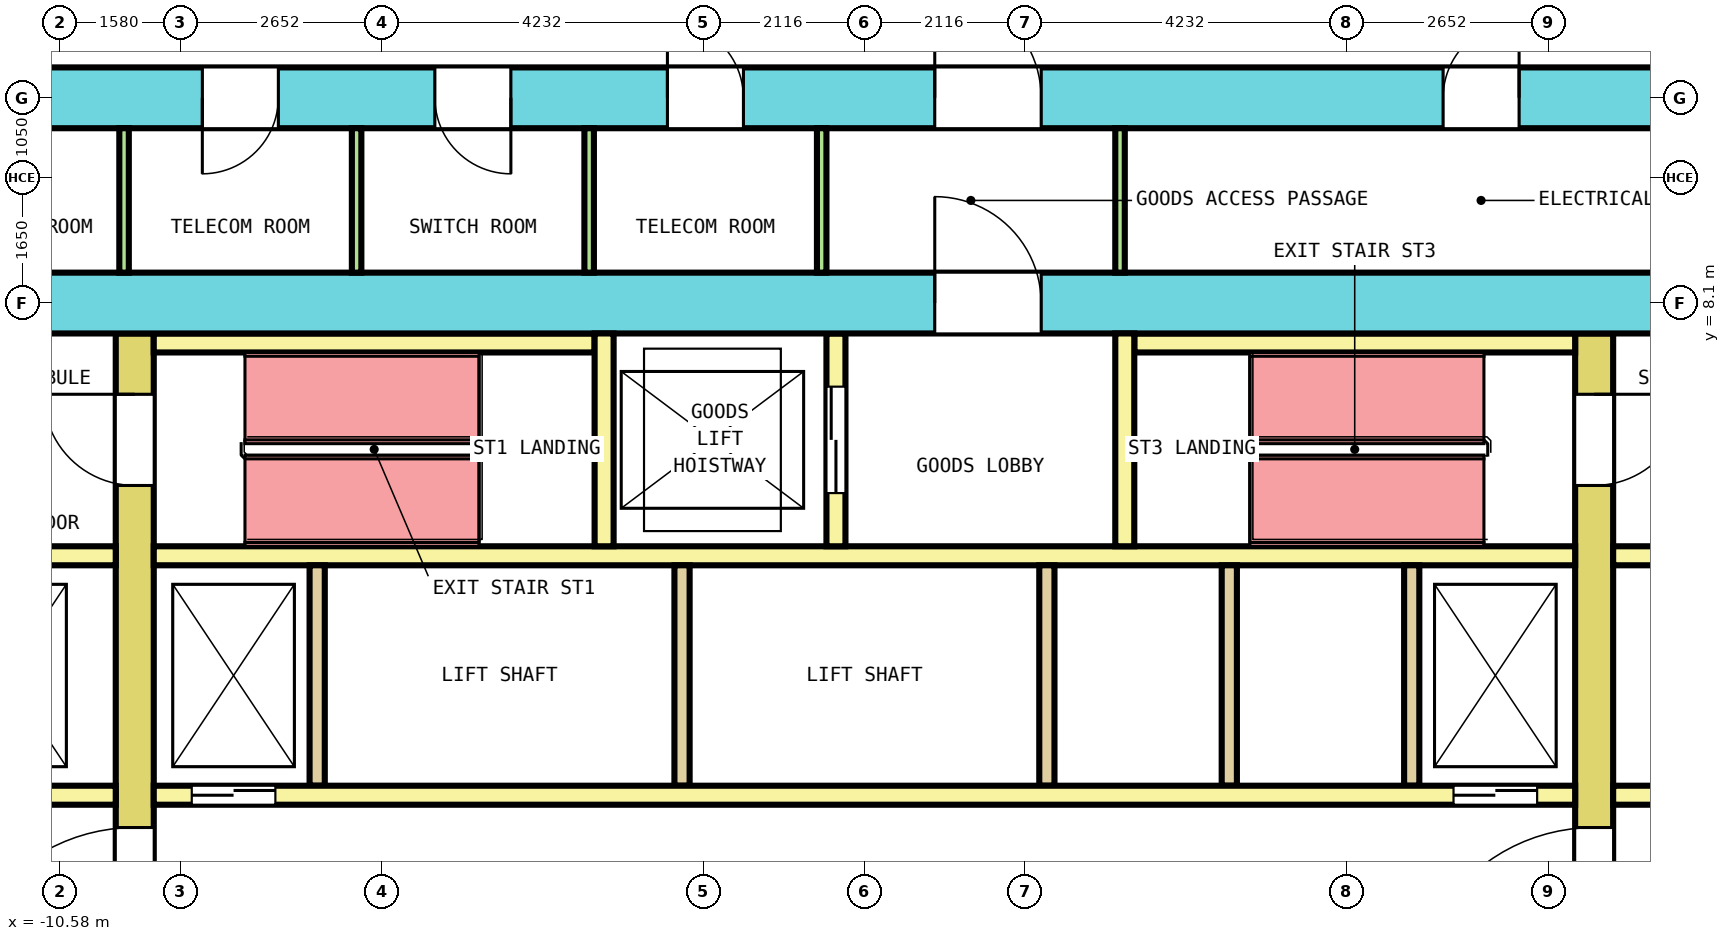
"""IFC4 building model, lengths in metres.
Left out: names, types, materials, properties, quantities, classifications, styles, units other than length and angle.
Written with IfcOpenShell. Run it as: python <this file> out.ifc"""

import sys

from ifc_helpers import new_model, si_unit, direction, frame, frame_2d, origin, place, context, subcontext, project, spatial, rectangle, extrude, element, fill, save


model = new_model("IFC4")
c1 = context("Model", 3, precision=1e-05, world=origin(), true_north=direction((0.0, 1.0)))
c2 = subcontext(c1, "Body", "Model", "MODEL_VIEW")
j1 = project(units=[si_unit("LENGTHUNIT", "METRE"), si_unit("PLANEANGLEUNIT", "RADIAN")], contexts=[c1])
p1 = place(None, origin())
s1 = spatial("IfcSite", under=j1, at=p1, CompositionType="ELEMENT")
p2 = place(p1, origin())
s2 = spatial("IfcBuilding", under=s1, at=p2, CompositionType="ELEMENT")
p3 = place(p2, frame((0.0, 0.0, 85.2)))
s3 = spatial("IfcBuildingStorey", under=s2, at=p3, CompositionType="ELEMENT", Elevation=85.2)
p4 = place(p3, frame((-13.6, 10.8, 0.0), z_axis=(0.0, 0.0, 1.0), x_axis=(1.0, 0.0, 0.0)))
e1 = element("IfcWall", 1, at=p4, inside=s3, PredefinedType="SHEAR", context=c2, shape_type="SweptSolid", body=[
    extrude(rectangle(XDim=27.2, YDim=0.8, at=frame_2d((13.6, 0.0))), origin(), (0.0, 0.0, 1.0), 4.1),
])
p5 = place(p4, frame((1.798, 0.0, 0.0)))
e2 = element("IfcOpeningElement", 2, at=p5, cuts=e1, PredefinedType="OPENING", context=c2, shape_type="SweptSolid", body=[
    extrude(rectangle(XDim=1.0, YDim=2.1, at=frame_2d((0.5, 1.05))), frame((0.0, 0.41, 0.0), z_axis=(0.0, -1.0, 0.0), x_axis=(1.0, 0.0, 0.0)), (0.0, 0.0, 1.0), 0.82),
])
p6 = place(p4, frame((4.889, 0.0, 0.0)))
e3 = element("IfcOpeningElement", 3, at=p6, cuts=e1, PredefinedType="OPENING", context=c2, shape_type="SweptSolid", body=[
    extrude(rectangle(XDim=1.0, YDim=2.1, at=frame_2d((0.5, 1.05))), frame((0.0, 0.41, 0.0), z_axis=(0.0, -1.0, 0.0), x_axis=(1.0, 0.0, 0.0)), (0.0, 0.0, 1.0), 0.82),
])
p7 = place(p4, frame((7.948, 0.0, 0.0)))
e4 = element("IfcOpeningElement", 4, at=p7, cuts=e1, PredefinedType="OPENING", context=c2, shape_type="SweptSolid", body=[
    extrude(rectangle(XDim=1.0, YDim=2.1, at=frame_2d((0.5, 1.05))), frame((0.0, 0.41, 0.0), z_axis=(0.0, -1.0, 0.0), x_axis=(1.0, 0.0, 0.0)), (0.0, 0.0, 1.0), 0.82),
])
p8 = place(p4, frame((11.008, 0.0, 0.0)))
e5 = element("IfcOpeningElement", 5, at=p8, cuts=e1, PredefinedType="OPENING", context=c2, shape_type="SweptSolid", body=[
    extrude(rectangle(XDim=1.0, YDim=2.1, at=frame_2d((0.5, 1.05))), frame((0.0, 0.41, 0.0), z_axis=(0.0, -1.0, 0.0), x_axis=(1.0, 0.0, 0.0)), (0.0, 0.0, 1.0), 0.82),
])
p9 = place(p4, frame((21.212, 0.0, 0.0)))
e6 = element("IfcOpeningElement", 6, at=p9, cuts=e1, PredefinedType="OPENING", context=c2, shape_type="SweptSolid", body=[
    extrude(rectangle(XDim=1.0, YDim=2.1, at=frame_2d((0.5, 1.05))), frame((0.0, 0.41, 0.0), z_axis=(0.0, -1.0, 0.0), x_axis=(1.0, 0.0, 0.0)), (0.0, 0.0, 1.0), 0.82),
])
p10 = place(p4, frame((14.525, 0.0, 0.0)))
e7 = element("IfcOpeningElement", 7, at=p10, cuts=e1, PredefinedType="OPENING", context=c2, shape_type="SweptSolid", body=[
    extrude(rectangle(XDim=1.4, YDim=2.1, at=frame_2d((0.7, 1.05))), frame((0.0, 0.41, 0.0), z_axis=(0.0, -1.0, 0.0), x_axis=(1.0, 0.0, 0.0)), (0.0, 0.0, 1.0), 0.82),
])
p11 = place(p3, frame((-12.8, 8.1, 0.0), z_axis=(0.0, 0.0, 1.0), x_axis=(1.0, 0.0, 0.0)))
e8 = element("IfcWall", 8, at=p11, inside=s3, PredefinedType="SHEAR", context=c2, shape_type="SweptSolid", body=[
    extrude(rectangle(XDim=25.6, YDim=0.8, at=frame_2d((12.8, 0.0))), origin(), (0.0, 0.0, 1.0), 4.1),
])
p12 = place(p11, frame((13.725, 0.0, 0.0)))
e9 = element("IfcOpeningElement", 9, at=p12, cuts=e8, PredefinedType="OPENING", context=c2, shape_type="SweptSolid", body=[
    extrude(rectangle(XDim=1.4, YDim=2.1, at=frame_2d((0.7, 1.05))), frame((0.0, 0.41, 0.0), z_axis=(0.0, -1.0, 0.0), x_axis=(1.0, 0.0, 0.0)), (0.0, 0.0, 1.0), 0.82),
])
p13 = place(p3, frame((-9.6, -7.7, 0.0), z_axis=(0.0, 0.0, 1.0), x_axis=(0.0, 1.0, 0.0)))
e10 = element("IfcWall", 10, at=p13, inside=s3, PredefinedType="SHEAR", context=c2, shape_type="SweptSolid", body=[
    extrude(rectangle(XDim=15.4, YDim=0.5, at=frame_2d((7.7, 0.0))), origin(), (0.0, 0.0, 1.0), 4.1),
])
p14 = place(p13, frame((6.5, 0.0, 0.0)))
e11 = element("IfcOpeningElement", 11, at=p14, cuts=e10, PredefinedType="OPENING", context=c2, shape_type="SweptSolid", body=[
    extrude(rectangle(XDim=2.4, YDim=2.1, at=frame_2d((1.2, 1.05))), frame((0.0, 0.26, 0.0), z_axis=(0.0, -1.0, 0.0), x_axis=(1.0, 0.0, 0.0)), (0.0, 0.0, 1.0), 0.52),
])
p15 = place(p13, frame((13.4, 0.0, 0.0)))
e12 = element("IfcOpeningElement", 12, at=p15, cuts=e10, PredefinedType="OPENING", context=c2, shape_type="SweptSolid", body=[
    extrude(rectangle(XDim=1.2, YDim=2.1, at=frame_2d((0.6, 1.05))), frame((0.0, 0.26, 0.0), z_axis=(0.0, -1.0, 0.0), x_axis=(1.0, 0.0, 0.0)), (0.0, 0.0, 1.0), 0.52),
])
p16 = place(p13, frame((0.8, 0.0, 0.0)))
e13 = element("IfcOpeningElement", 13, at=p16, cuts=e10, PredefinedType="OPENING", context=c2, shape_type="SweptSolid", body=[
    extrude(rectangle(XDim=1.2, YDim=2.1, at=frame_2d((0.6, 1.05))), frame((0.0, 0.26, 0.0), z_axis=(0.0, -1.0, 0.0), x_axis=(1.0, 0.0, 0.0)), (0.0, 0.0, 1.0), 0.52),
])
p17 = place(p3, frame((9.6, -7.7, 0.0), z_axis=(0.0, 0.0, 1.0), x_axis=(0.0, 1.0, 0.0)))
e14 = element("IfcWall", 14, at=p17, inside=s3, PredefinedType="SHEAR", context=c2, shape_type="SweptSolid", body=[
    extrude(rectangle(XDim=15.4, YDim=0.5, at=frame_2d((7.7, 0.0))), origin(), (0.0, 0.0, 1.0), 4.1),
])
p18 = place(p17, frame((6.5, 0.0, 0.0)))
e15 = element("IfcOpeningElement", 15, at=p18, cuts=e14, PredefinedType="OPENING", context=c2, shape_type="SweptSolid", body=[
    extrude(rectangle(XDim=2.4, YDim=2.1, at=frame_2d((1.2, 1.05))), frame((0.0, 0.26, 0.0), z_axis=(0.0, -1.0, 0.0), x_axis=(1.0, 0.0, 0.0)), (0.0, 0.0, 1.0), 0.52),
])
p19 = place(p17, frame((13.4, 0.0, 0.0)))
e16 = element("IfcOpeningElement", 16, at=p19, cuts=e14, PredefinedType="OPENING", context=c2, shape_type="SweptSolid", body=[
    extrude(rectangle(XDim=1.2, YDim=2.1, at=frame_2d((0.6, 1.05))), frame((0.0, 0.26, 0.0), z_axis=(0.0, -1.0, 0.0), x_axis=(1.0, 0.0, 0.0)), (0.0, 0.0, 1.0), 0.52),
])
p20 = place(p17, frame((0.9, 0.0, 0.0)))
e17 = element("IfcOpeningElement", 17, at=p20, cuts=e14, PredefinedType="OPENING", context=c2, shape_type="SweptSolid", body=[
    extrude(rectangle(XDim=1.0, YDim=2.1, at=frame_2d((0.5, 1.05))), frame((0.0, 0.26, 0.0), z_axis=(0.0, -1.0, 0.0), x_axis=(1.0, 0.0, 0.0)), (0.0, 0.0, 1.0), 0.52),
])
p21 = place(p3, frame((-12.8, 1.625, 0.0), z_axis=(0.0, 0.0, 1.0), x_axis=(1.0, 0.0, 0.0)))
e18 = element("IfcWall", 18, at=p21, inside=s3, PredefinedType="SOLIDWALL", context=c2, shape_type="SweptSolid", body=[
    extrude(rectangle(XDim=2.95, YDim=0.25, at=frame_2d((1.475, 0.0))), origin(), (0.0, 0.0, 1.0), 4.1),
])
p22 = place(p21, frame((0.925, 0.0, 0.0)))
e19 = element("IfcOpeningElement", 19, at=p22, cuts=e18, PredefinedType="OPENING", context=c2, shape_type="SweptSolid", body=[
    extrude(rectangle(XDim=1.1, YDim=2.1, at=frame_2d((0.55, 1.05))), frame((0.0, 0.135, 0.0), z_axis=(0.0, -1.0, 0.0), x_axis=(1.0, 0.0, 0.0)), (0.0, 0.0, 1.0), 0.27),
])
p23 = place(p3, frame((-9.35, 1.625, 0.0), z_axis=(0.0, 0.0, 1.0), x_axis=(1.0, 0.0, 0.0)))
e20 = element("IfcWall", 20, at=p23, inside=s3, PredefinedType="SOLIDWALL", context=c2, shape_type="SweptSolid", body=[
    extrude(rectangle(XDim=18.7, YDim=0.25, at=frame_2d((9.35, 0.0))), origin(), (0.0, 0.0, 1.0), 4.1),
])
p24 = place(p23, frame((0.5, 0.0, 0.0)))
e21 = element("IfcOpeningElement", 21, at=p24, cuts=e20, PredefinedType="OPENING", context=c2, shape_type="SweptSolid", body=[
    extrude(rectangle(XDim=1.1, YDim=2.1, at=frame_2d((0.55, 1.05))), frame((0.0, 0.135, 0.0), z_axis=(0.0, -1.0, 0.0), x_axis=(1.0, 0.0, 0.0)), (0.0, 0.0, 1.0), 0.27),
])
p25 = place(p23, frame((17.1, 0.0, 0.0)))
e22 = element("IfcOpeningElement", 22, at=p25, cuts=e20, PredefinedType="OPENING", context=c2, shape_type="SweptSolid", body=[
    extrude(rectangle(XDim=1.1, YDim=2.1, at=frame_2d((0.55, 1.05))), frame((0.0, 0.135, 0.0), z_axis=(0.0, -1.0, 0.0), x_axis=(1.0, 0.0, 0.0)), (0.0, 0.0, 1.0), 0.27),
])
p26 = place(p3, frame((9.85, 1.625, 0.0), z_axis=(0.0, 0.0, 1.0), x_axis=(1.0, 0.0, 0.0)))
e23 = element("IfcWall", 23, at=p26, inside=s3, PredefinedType="SOLIDWALL", context=c2, shape_type="SweptSolid", body=[
    extrude(rectangle(XDim=2.95, YDim=0.25, at=frame_2d((1.475, 0.0))), origin(), (0.0, 0.0, 1.0), 4.1),
])
p27 = place(p26, frame((0.925, 0.0, 0.0)))
e24 = element("IfcOpeningElement", 24, at=p27, cuts=e23, PredefinedType="OPENING", context=c2, shape_type="SweptSolid", body=[
    extrude(rectangle(XDim=1.1, YDim=2.1, at=frame_2d((0.55, 1.05))), frame((0.0, 0.135, 0.0), z_axis=(0.0, -1.0, 0.0), x_axis=(1.0, 0.0, 0.0)), (0.0, 0.0, 1.0), 0.27),
])
p28 = place(p3, frame((-12.8, 4.775, 0.0), z_axis=(0.0, 0.0, 1.0), x_axis=(1.0, 0.0, 0.0)))
e25 = element("IfcWall", 25, at=p28, inside=s3, PredefinedType="SOLIDWALL", context=c2, shape_type="SweptSolid", body=[
    extrude(rectangle(XDim=2.95, YDim=0.25, at=frame_2d((1.475, 0.0))), origin(), (0.0, 0.0, 1.0), 4.1),
])
p29 = place(p3, frame((-9.35, 4.775, 0.0), z_axis=(0.0, 0.0, 1.0), x_axis=(1.0, 0.0, 0.0)))
e26 = element("IfcWall", 26, at=p29, inside=s3, PredefinedType="SOLIDWALL", context=c2, shape_type="SweptSolid", body=[
    extrude(rectangle(XDim=18.7, YDim=0.25, at=frame_2d((9.35, 0.0))), origin(), (0.0, 0.0, 1.0), 4.1),
])
p30 = place(p3, frame((9.85, 4.775, 0.0), z_axis=(0.0, 0.0, 1.0), x_axis=(1.0, 0.0, 0.0)))
e27 = element("IfcWall", 27, at=p30, inside=s3, PredefinedType="SOLIDWALL", context=c2, shape_type="SweptSolid", body=[
    extrude(rectangle(XDim=2.95, YDim=0.25, at=frame_2d((1.475, 0.0))), origin(), (0.0, 0.0, 1.0), 4.1),
])
for number, where, z_axis, x_axis in (
    (28, (-7.2, 1.75, 0.0), (0.0, 0.0, 1.0), (0.0, 1.0, 0.0)),
    (29, (-2.4, 1.75, 0.0), (0.0, 0.0, 1.0), (0.0, 1.0, 0.0)),
    (30, (2.4, 1.75, 0.0), (0.0, 0.0, 1.0), (0.0, 1.0, 0.0)),
    (31, (4.8, 1.75, 0.0), (0.0, 0.0, 1.0), (0.0, 1.0, 0.0)),
    (32, (7.2, 1.75, 0.0), (0.0, 0.0, 1.0), (0.0, 1.0, 0.0)),
):
    element("IfcWall", number, at=place(p3, frame(where, z_axis=z_axis, x_axis=x_axis)), inside=s3, PredefinedType="SOLIDWALL", context=c2, shape_type="SweptSolid", body=[
        extrude(rectangle(XDim=2.9, YDim=0.2, at=frame_2d((1.45, 0.0))), origin(), (0.0, 0.0, 1.0), 4.1),
    ])
for number, where, z_axis, x_axis in (
    (33, (-9.35, 7.575, 0.0), (0.0, 0.0, 1.0), (1.0, 0.0, 0.0)),
    (34, (3.55, 7.575, 0.0), (0.0, 0.0, 1.0), (1.0, 0.0, 0.0)),
):
    element("IfcWall", number, at=place(p3, frame(where, z_axis=z_axis, x_axis=x_axis)), inside=s3, PredefinedType="SOLIDWALL", context=c2, shape_type="SweptSolid", body=[
        extrude(rectangle(XDim=5.8, YDim=0.25, at=frame_2d((2.9, 0.0))), origin(), (0.0, 0.0, 1.0), 4.1),
    ])
p31 = place(p3, frame((-3.425, 4.9, 0.0), z_axis=(0.0, 0.0, 1.0), x_axis=(0.0, 1.0, 0.0)))
e35 = element("IfcWall", 35, at=p31, inside=s3, PredefinedType="SOLIDWALL", context=c2, shape_type="SweptSolid", body=[
    extrude(rectangle(XDim=2.8, YDim=0.25, at=frame_2d((1.4, 0.0))), origin(), (0.0, 0.0, 1.0), 4.1),
])
p32 = place(p3, frame((-0.375, 4.9, 0.0), z_axis=(0.0, 0.0, 1.0), x_axis=(0.0, 1.0, 0.0)))
e36 = element("IfcWall", 36, at=p32, inside=s3, PredefinedType="SOLIDWALL", context=c2, shape_type="SweptSolid", body=[
    extrude(rectangle(XDim=2.8, YDim=0.25, at=frame_2d((1.4, 0.0))), origin(), (0.0, 0.0, 1.0), 4.1),
])
p33 = place(p32, frame((0.7, 0.0, 0.0)))
e37 = element("IfcOpeningElement", 37, at=p33, cuts=e36, PredefinedType="OPENING", context=c2, shape_type="SweptSolid", body=[
    extrude(rectangle(XDim=1.4, YDim=2.1, at=frame_2d((0.7, 1.05))), frame((0.0, 0.135, 0.0), z_axis=(0.0, -1.0, 0.0), x_axis=(1.0, 0.0, 0.0)), (0.0, 0.0, 1.0), 0.27),
])
p34 = place(p3, frame((3.425, 4.9, 0.0), z_axis=(0.0, 0.0, 1.0), x_axis=(0.0, 1.0, 0.0)))
e38 = element("IfcWall", 38, at=p34, inside=s3, PredefinedType="SOLIDWALL", context=c2, shape_type="SweptSolid", body=[
    extrude(rectangle(XDim=2.8, YDim=0.25, at=frame_2d((1.4, 0.0))), origin(), (0.0, 0.0, 1.0), 4.1),
])
for number, where, z_axis, x_axis in (
    (39, (-9.74, 8.5, 0.0), (0.0, 0.0, 1.0), (0.0, 1.0, 0.0)),
    (40, (-6.681, 8.5, 0.0), (0.0, 0.0, 1.0), (0.0, 1.0, 0.0)),
    (41, (-3.622, 8.5, 0.0), (0.0, 0.0, 1.0), (0.0, 1.0, 0.0)),
    (42, (-0.562, 8.5, 0.0), (0.0, 0.0, 1.0), (0.0, 1.0, 0.0)),
    (43, (3.363, 8.5, 0.0), (0.0, 0.0, 1.0), (0.0, 1.0, 0.0)),
):
    element("IfcWall", number, at=place(p3, frame(where, z_axis=z_axis, x_axis=x_axis)), inside=s3, PredefinedType="PARTITIONING", context=c2, shape_type="SweptSolid", body=[
        extrude(rectangle(XDim=1.9, YDim=0.125, at=frame_2d((0.95, 0.0))), origin(), (0.0, 0.0, 1.0), 4.1),
    ])
p35 = place(p24, origin())
e44 = element("IfcDoor", 44, at=p35, inside=s3, OperationType="DOUBLE_DOOR_SLIDING", PredefinedType="DOOR", context=c2, shape_type="SweptSolid", body=[
    extrude(rectangle(XDim=1.1, YDim=2.1, at=frame_2d((0.55, 1.05))), frame((0.0, 0.075, 0.0), z_axis=(0.0, -1.0, 0.0), x_axis=(1.0, 0.0, 0.0)), (0.0, 0.0, 1.0), 0.15),
])
fill(e21, e44)
p36 = place(p25, origin())
e45 = element("IfcDoor", 45, at=p36, inside=s3, OperationType="DOUBLE_DOOR_SLIDING", PredefinedType="DOOR", context=c2, shape_type="SweptSolid", body=[
    extrude(rectangle(XDim=1.1, YDim=2.1, at=frame_2d((0.55, 1.05))), frame((0.0, 0.075, 0.0), z_axis=(0.0, -1.0, 0.0), x_axis=(1.0, 0.0, 0.0)), (0.0, 0.0, 1.0), 0.15),
])
fill(e22, e45)
p37 = place(p33, origin())
e46 = element("IfcDoor", 46, at=p37, inside=s3, OperationType="DOUBLE_DOOR_SLIDING", PredefinedType="DOOR", context=c2, shape_type="SweptSolid", body=[
    extrude(rectangle(XDim=1.4, YDim=2.1, at=frame_2d((0.7, 1.05))), frame((0.0, 0.075, 0.0), z_axis=(0.0, -1.0, 0.0), x_axis=(1.0, 0.0, 0.0)), (0.0, 0.0, 1.0), 0.15),
])
fill(e37, e46)
p38 = place(p14, origin())
e47 = element("IfcDoor", 47, at=p38, inside=s3, OperationType="DOUBLE_DOOR_SINGLE_SWING", PredefinedType="DOOR", context=c2, shape_type="SweptSolid", body=[
    extrude(rectangle(XDim=2.4, YDim=2.1, at=frame_2d((1.2, 1.05))), frame((0.0, 0.2, 0.0), z_axis=(0.0, -1.0, 0.0), x_axis=(1.0, 0.0, 0.0)), (0.0, 0.0, 1.0), 0.4),
])
fill(e11, e47)
p39 = place(p18, origin())
e48 = element("IfcDoor", 48, at=p39, inside=s3, OperationType="DOUBLE_DOOR_SINGLE_SWING", PredefinedType="DOOR", context=c2, shape_type="SweptSolid", body=[
    extrude(rectangle(XDim=2.4, YDim=2.1, at=frame_2d((1.2, 1.05))), frame((0.0, 0.2, 0.0), z_axis=(0.0, -1.0, 0.0), x_axis=(1.0, 0.0, 0.0)), (0.0, 0.0, 1.0), 0.4),
])
fill(e15, e48)
p40 = place(p15, origin())
e49 = element("IfcDoor", 49, at=p40, inside=s3, OperationType="SINGLE_SWING_LEFT", PredefinedType="DOOR", context=c2, shape_type="SweptSolid", body=[
    extrude(rectangle(XDim=1.2, YDim=2.1, at=frame_2d((0.6, 1.05))), frame((0.0, 0.2, 0.0), z_axis=(0.0, -1.0, 0.0), x_axis=(1.0, 0.0, 0.0)), (0.0, 0.0, 1.0), 0.4),
])
fill(e12, e49)
p41 = place(p19, origin())
e50 = element("IfcDoor", 50, at=p41, inside=s3, OperationType="SINGLE_SWING_LEFT", PredefinedType="DOOR", context=c2, shape_type="SweptSolid", body=[
    extrude(rectangle(XDim=1.2, YDim=2.1, at=frame_2d((0.6, 1.05))), frame((0.0, 0.2, 0.0), z_axis=(0.0, -1.0, 0.0), x_axis=(1.0, 0.0, 0.0)), (0.0, 0.0, 1.0), 0.4),
])
fill(e16, e50)
p42 = place(p12, origin())
e51 = element("IfcDoor", 51, at=p42, inside=s3, OperationType="DOUBLE_DOOR_SINGLE_SWING", PredefinedType="DOOR", context=c2, shape_type="SweptSolid", body=[
    extrude(rectangle(XDim=1.4, YDim=2.1, at=frame_2d((0.7, 1.05))), frame((0.0, 0.3, 0.0), z_axis=(0.0, -1.0, 0.0), x_axis=(1.0, 0.0, 0.0)), (0.0, 0.0, 1.0), 0.6),
])
fill(e9, e51)
p43 = place(p6, origin())
e52 = element("IfcDoor", 52, at=p43, inside=s3, OperationType="SINGLE_SWING_LEFT", PredefinedType="DOOR", context=c2, shape_type="SweptSolid", body=[
    extrude(rectangle(XDim=1.0, YDim=2.1, at=frame_2d((0.5, 1.05))), frame((0.0, 0.3, 0.0), z_axis=(0.0, -1.0, 0.0), x_axis=(1.0, 0.0, 0.0)), (0.0, 0.0, 1.0), 0.6),
])
fill(e3, e52)
p44 = place(p7, origin())
e53 = element("IfcDoor", 53, at=p44, inside=s3, OperationType="SINGLE_SWING_RIGHT", PredefinedType="DOOR", context=c2, shape_type="SweptSolid", body=[
    extrude(rectangle(XDim=1.0, YDim=2.1, at=frame_2d((0.5, 1.05))), frame((0.0, 0.3, 0.0), z_axis=(0.0, -1.0, 0.0), x_axis=(1.0, 0.0, 0.0)), (0.0, 0.0, 1.0), 0.6),
])
fill(e4, e53)
p45 = place(p8, origin())
e54 = element("IfcDoor", 54, at=p45, inside=s3, OperationType="SINGLE_SWING_LEFT", PredefinedType="DOOR", context=c2, shape_type="SweptSolid", body=[
    extrude(rectangle(XDim=1.0, YDim=2.1, at=frame_2d((0.5, 1.05))), frame((0.0, 0.3, 0.0), z_axis=(0.0, -1.0, 0.0), x_axis=(1.0, 0.0, 0.0)), (0.0, 0.0, 1.0), 0.6),
])
fill(e5, e54)
p46 = place(p9, origin())
e55 = element("IfcDoor", 55, at=p46, inside=s3, OperationType="SINGLE_SWING_RIGHT", PredefinedType="DOOR", context=c2, shape_type="SweptSolid", body=[
    extrude(rectangle(XDim=1.0, YDim=2.1, at=frame_2d((0.5, 1.05))), frame((0.0, 0.3, 0.0), z_axis=(0.0, -1.0, 0.0), x_axis=(1.0, 0.0, 0.0)), (0.0, 0.0, 1.0), 0.6),
])
fill(e6, e55)
p47 = place(p10, origin())
e56 = element("IfcDoor", 56, at=p47, inside=s3, OperationType="DOUBLE_DOOR_SINGLE_SWING", PredefinedType="DOOR", context=c2, shape_type="SweptSolid", body=[
    extrude(rectangle(XDim=1.4, YDim=2.1, at=frame_2d((0.7, 1.05))), frame((0.0, 0.3, 0.0), z_axis=(0.0, -1.0, 0.0), x_axis=(1.0, 0.0, 0.0)), (0.0, 0.0, 1.0), 0.6),
])
fill(e7, e56)
save(model, sys.argv[1])
